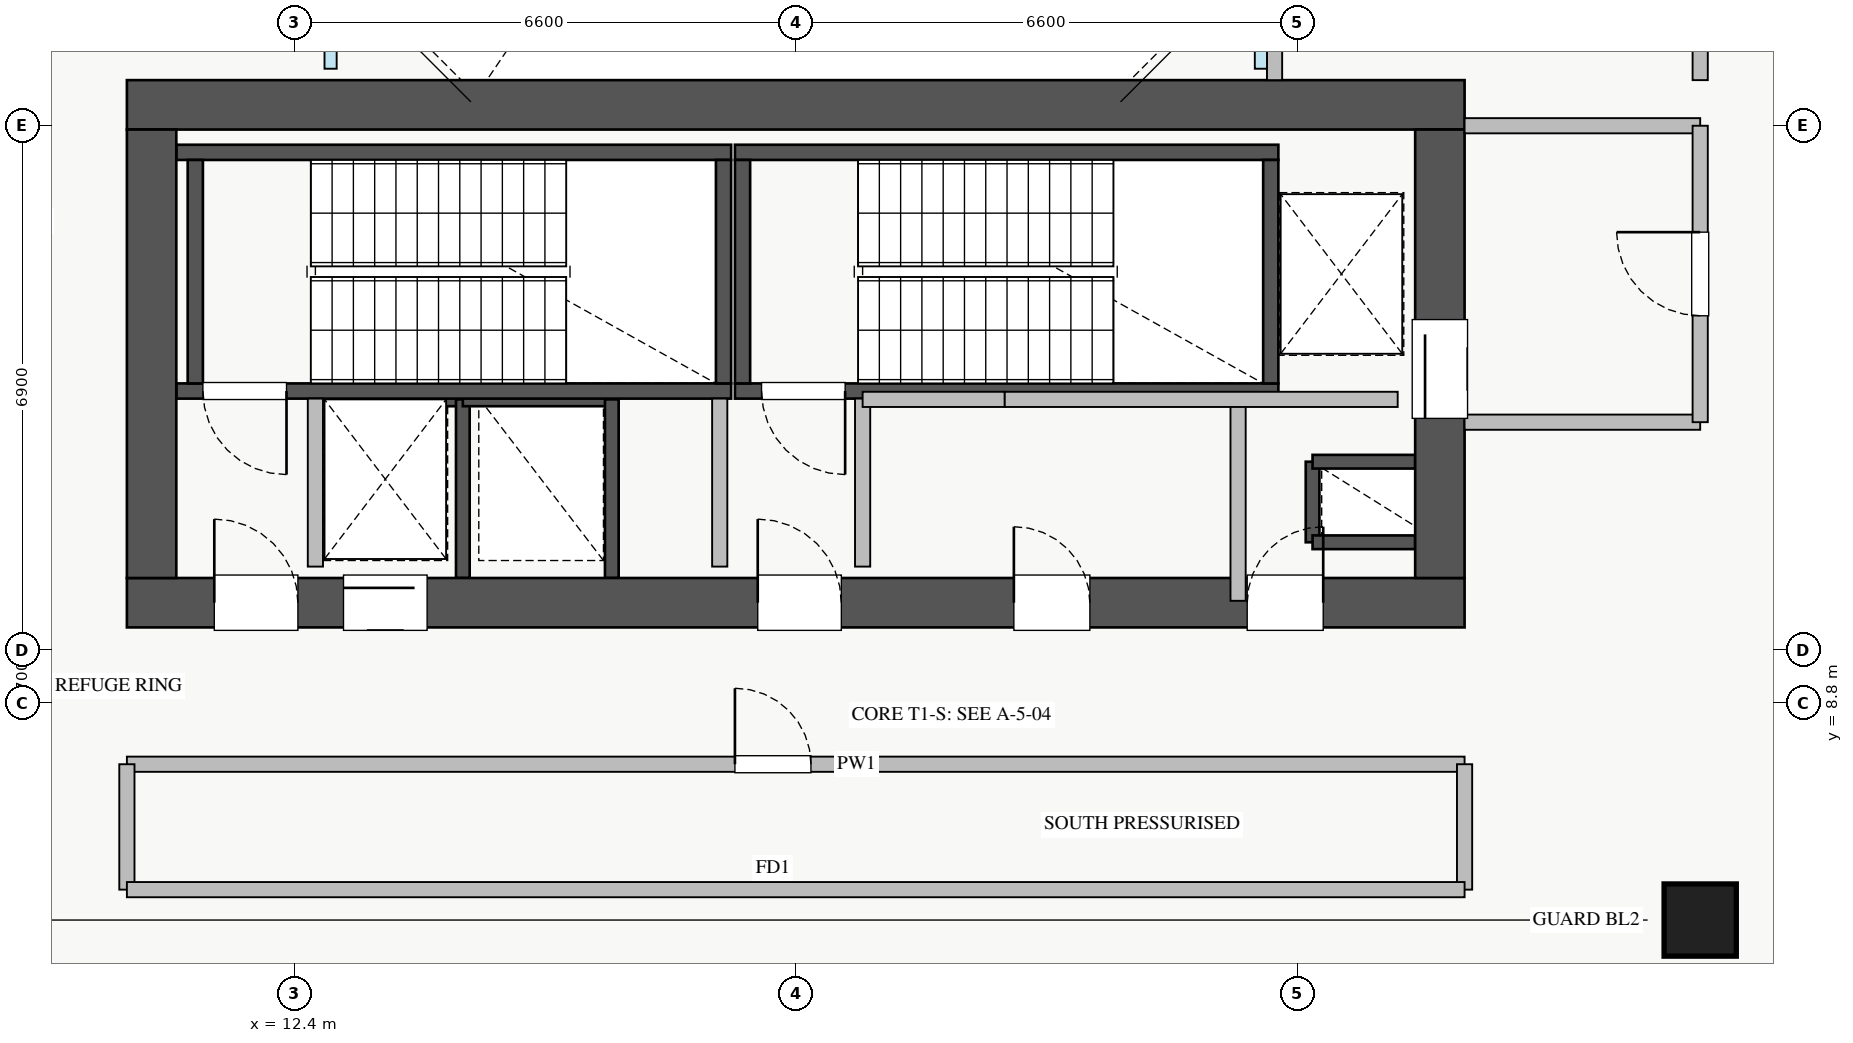
"""IFC4 building model, lengths in metres.
Left out: names, types, materials, properties, quantities, classifications, styles, units other than length and angle.
Written with IfcOpenShell. Run it as: python <this file> out.ifc"""

import sys

from ifc_helpers import new_model, si_unit, direction, frame, frame_2d, origin, origin_2d, place, context, subcontext, project, spatial, rectangle, extrude, source, transform, mapped, element, fill, save


model = new_model("IFC4")
c1 = context("Model", 3, precision=1e-05, world=origin(), true_north=direction((0.0, 1.0)))
c2 = subcontext(c1, "Body", "Model", "MODEL_VIEW")
j1 = project(units=[si_unit("LENGTHUNIT", "METRE"), si_unit("PLANEANGLEUNIT", "RADIAN")], contexts=[c1])
p1 = place(None, origin())
s1 = spatial("IfcSite", under=j1, at=p1, CompositionType="ELEMENT")
p2 = place(p1, origin())
s2 = spatial("IfcBuilding", under=s1, at=p2, CompositionType="ELEMENT")
p3 = place(p2, frame((0.0, 0.0, 186.0)))
s3 = spatial("IfcBuildingStorey", under=s2, at=p3, CompositionType="ELEMENT", Elevation=186.0)
p4 = place(p3, frame((12.68, 12.8, 0.0), z_axis=(0.0, 0.0, 1.0), x_axis=(1.0, 0.0, 0.0)))
e1 = element("IfcWall", 1, at=p4, inside=s3, PredefinedType="SHEAR", context=c2, shape_type="SweptSolid", body=[
    extrude(rectangle(XDim=1.94, YDim=0.18, at=frame_2d((0.97, 0.0))), origin(), (0.0, 0.0, 1.0), 4.32),
])
p5 = place(p3, frame((14.62, 10.45, 0.0), z_axis=(0.0, 0.0, 1.0), x_axis=(0.0, 1.0, 0.0)))
e2 = element("IfcWall", 2, at=p5, inside=s3, PredefinedType="SHEAR", context=c2, shape_type="SweptSolid", body=[
    extrude(rectangle(XDim=2.35, YDim=0.18, at=frame_2d((1.175, 0.0))), origin(), (0.0, 0.0, 1.0), 4.32),
])
p6 = place(p3, frame((25.8, 10.92, 0.0), z_axis=(0.0, 0.0, 1.0), x_axis=(0.0, 1.0, 0.0)))
e3 = element("IfcWall", 3, at=p6, inside=s3, PredefinedType="SHEAR", context=c2, shape_type="SweptSolid", body=[
    extrude(rectangle(XDim=1.06, YDim=0.18, at=frame_2d((0.53, 0.0))), origin(), (0.0, 0.0, 1.0), 4.32),
])
for number, where, z_axis, x_axis in (
    (4, (25.8, 11.98, 0.0), (0.0, 0.0, 1.0), (1.0, 0.0, 0.0)),
    (5, (25.8, 10.92, 0.0), (0.0, 0.0, 1.0), (1.0, 0.0, 0.0)),
):
    element("IfcWall", number, at=place(p3, frame(where, z_axis=z_axis, x_axis=x_axis)), inside=s3, PredefinedType="SHEAR", context=c2, shape_type="SweptSolid", body=[
        extrude(rectangle(XDim=1.35, YDim=0.18, at=frame_2d((0.675, 0.0))), origin(), (0.0, 0.0, 1.0), 4.32),
    ])
p7 = place(p3, frame((14.62, 12.8, 0.0), z_axis=(0.0, 0.0, 1.0), x_axis=(1.0, 0.0, 0.0)))
e6 = element("IfcWall", 6, at=p7, inside=s3, PredefinedType="SHEAR", context=c2, shape_type="SweptSolid", body=[
    extrude(rectangle(XDim=1.96, YDim=0.18, at=frame_2d((0.98, 0.0))), origin(), (0.0, 0.0, 1.0), 4.32),
])
p8 = place(p3, frame((16.58, 10.45, 0.0), z_axis=(0.0, 0.0, 1.0), x_axis=(0.0, 1.0, 0.0)))
e7 = element("IfcWall", 7, at=p8, inside=s3, PredefinedType="SHEAR", context=c2, shape_type="SweptSolid", body=[
    extrude(rectangle(XDim=2.35, YDim=0.18, at=frame_2d((1.175, 0.0))), origin(), (0.0, 0.0, 1.0), 4.32),
])
p9 = place(p3, frame((10.85, 12.91, 0.0), z_axis=(0.0, 0.0, 1.0), x_axis=(1.0, 0.0, 0.0)))
e8 = element("IfcWall", 8, at=p9, inside=s3, PredefinedType="SHEAR", context=c2, shape_type="SweptSolid", body=[
    extrude(rectangle(XDim=7.3, YDim=0.2, at=frame_2d((3.65, 0.0))), origin(), (0.0, 0.0, 1.0), 4.5),
])
p10 = place(p9, frame((0.35, 0.0, 0.0)))
e9 = element("IfcOpeningElement", 9, at=p10, cuts=e8, PredefinedType="OPENING", context=c2, shape_type="SweptSolid", body=[
    extrude(rectangle(XDim=1.1, YDim=2.05, at=frame_2d((0.55, 1.025))), frame((0.0, 0.11, 0.0), z_axis=(0.0, -1.0, 0.0), x_axis=(1.0, 0.0, 0.0)), (0.0, 0.0, 1.0), 0.22),
])
p11 = place(p3, frame((10.85, 16.05, 0.0), z_axis=(0.0, 0.0, 1.0), x_axis=(1.0, 0.0, 0.0)))
e10 = element("IfcWall", 10, at=p11, inside=s3, PredefinedType="SHEAR", context=c2, shape_type="SweptSolid", body=[
    extrude(rectangle(XDim=7.3, YDim=0.2, at=frame_2d((3.65, 0.0))), origin(), (0.0, 0.0, 1.0), 4.5),
])
for number, where, z_axis, x_axis in (
    (11, (11.1, 13.01, 0.0), (0.0, 0.0, 1.0), (0.0, 1.0, 0.0)),
    (12, (18.05, 13.01, 0.0), (0.0, 0.0, 1.0), (0.0, 1.0, 0.0)),
):
    element("IfcWall", number, at=place(p3, frame(where, z_axis=z_axis, x_axis=x_axis)), inside=s3, PredefinedType="SHEAR", context=c2, shape_type="SweptSolid", body=[
        extrude(rectangle(XDim=2.94, YDim=0.2, at=frame_2d((1.47, 0.0))), origin(), (0.0, 0.0, 1.0), 4.5),
    ])
p12 = place(p3, frame((18.2, 12.91, 0.0), z_axis=(0.0, 0.0, 1.0), x_axis=(1.0, 0.0, 0.0)))
e13 = element("IfcWall", 13, at=p12, inside=s3, PredefinedType="SHEAR", context=c2, shape_type="SweptSolid", body=[
    extrude(rectangle(XDim=7.15, YDim=0.2, at=frame_2d((3.575, 0.0))), origin(), (0.0, 0.0, 1.0), 4.5),
])
p13 = place(p12, frame((0.35, 0.0, 0.0)))
e14 = element("IfcOpeningElement", 14, at=p13, cuts=e13, PredefinedType="OPENING", context=c2, shape_type="SweptSolid", body=[
    extrude(rectangle(XDim=1.1, YDim=2.05, at=frame_2d((0.55, 1.025))), frame((0.0, 0.11, 0.0), z_axis=(0.0, -1.0, 0.0), x_axis=(1.0, 0.0, 0.0)), (0.0, 0.0, 1.0), 0.22),
])
p14 = place(p3, frame((18.2, 16.05, 0.0), z_axis=(0.0, 0.0, 1.0), x_axis=(1.0, 0.0, 0.0)))
e15 = element("IfcWall", 15, at=p14, inside=s3, PredefinedType="SHEAR", context=c2, shape_type="SweptSolid", body=[
    extrude(rectangle(XDim=7.15, YDim=0.2, at=frame_2d((3.575, 0.0))), origin(), (0.0, 0.0, 1.0), 4.5),
])
for number, where, z_axis, x_axis in (
    (16, (18.3, 13.01, 0.0), (0.0, 0.0, 1.0), (0.0, 1.0, 0.0)),
    (17, (25.25, 13.01, 0.0), (0.0, 0.0, 1.0), (0.0, 1.0, 0.0)),
):
    element("IfcWall", number, at=place(p3, frame(where, z_axis=z_axis, x_axis=x_axis)), inside=s3, PredefinedType="SHEAR", context=c2, shape_type="SweptSolid", body=[
        extrude(rectangle(XDim=2.94, YDim=0.2, at=frame_2d((1.47, 0.0))), origin(), (0.0, 0.0, 1.0), 4.5),
    ])
p15 = place(p3, frame((10.2, 10.125, 0.0), z_axis=(0.0, 0.0, 1.0), x_axis=(1.0, 0.0, 0.0)))
e18 = element("IfcWall", 18, at=p15, inside=s3, PredefinedType="SHEAR", context=c2, shape_type="SweptSolid", body=[
    extrude(rectangle(XDim=17.6, YDim=0.65, at=frame_2d((8.8, 0.0))), origin(), (0.0, 0.0, 1.0), 4.5),
])
p16 = place(p15, frame((1.15, 0.0, 0.0)))
e19 = element("IfcOpeningElement", 19, at=p16, cuts=e18, PredefinedType="OPENING", context=c2, shape_type="SweptSolid", body=[
    extrude(rectangle(XDim=1.1, YDim=2.05, at=frame_2d((0.55, 1.025))), frame((0.0, 0.335, 0.0), z_axis=(0.0, -1.0, 0.0), x_axis=(1.0, 0.0, 0.0)), (0.0, 0.0, 1.0), 0.67),
])
p17 = place(p15, frame((8.3, 0.0, 0.0)))
e20 = element("IfcOpeningElement", 20, at=p17, cuts=e18, PredefinedType="OPENING", context=c2, shape_type="SweptSolid", body=[
    extrude(rectangle(XDim=1.1, YDim=2.05, at=frame_2d((0.55, 1.025))), frame((0.0, 0.335, 0.0), z_axis=(0.0, -1.0, 0.0), x_axis=(1.0, 0.0, 0.0)), (0.0, 0.0, 1.0), 0.67),
])
p18 = place(p15, frame((2.85, 0.0, 0.0)))
e21 = element("IfcOpeningElement", 21, at=p18, cuts=e18, PredefinedType="OPENING", context=c2, shape_type="SweptSolid", body=[
    extrude(rectangle(XDim=1.1, YDim=2.05, at=frame_2d((0.55, 1.025))), frame((0.0, 0.335, 0.0), z_axis=(0.0, -1.0, 0.0), x_axis=(1.0, 0.0, 0.0)), (0.0, 0.0, 1.0), 0.67),
])
p19 = place(p15, frame((14.74, 0.0, 0.0)))
e22 = element("IfcOpeningElement", 22, at=p19, cuts=e18, PredefinedType="OPENING", context=c2, shape_type="SweptSolid", body=[
    extrude(rectangle(XDim=1.0, YDim=2.05, at=frame_2d((0.5, 1.025))), frame((0.0, 0.335, 0.0), z_axis=(0.0, -1.0, 0.0), x_axis=(1.0, 0.0, 0.0)), (0.0, 0.0, 1.0), 0.67),
])
p20 = place(p15, frame((11.67, 0.0, 0.0)))
e23 = element("IfcOpeningElement", 23, at=p20, cuts=e18, PredefinedType="OPENING", context=c2, shape_type="SweptSolid", body=[
    extrude(rectangle(XDim=1.0, YDim=2.05, at=frame_2d((0.5, 1.025))), frame((0.0, 0.335, 0.0), z_axis=(0.0, -1.0, 0.0), x_axis=(1.0, 0.0, 0.0)), (0.0, 0.0, 1.0), 0.67),
])
p21 = place(p3, frame((10.2, 16.675, 0.0), z_axis=(0.0, 0.0, 1.0), x_axis=(1.0, 0.0, 0.0)))
e24 = element("IfcWall", 24, at=p21, inside=s3, PredefinedType="SHEAR", context=c2, shape_type="SweptSolid", body=[
    extrude(rectangle(XDim=17.6, YDim=0.65, at=frame_2d((8.8, 0.0))), origin(), (0.0, 0.0, 1.0), 4.5),
])
p22 = place(p3, frame((10.525, 10.45, 0.0), z_axis=(0.0, 0.0, 1.0), x_axis=(0.0, 1.0, 0.0)))
e25 = element("IfcWall", 25, at=p22, inside=s3, PredefinedType="SHEAR", context=c2, shape_type="SweptSolid", body=[
    extrude(rectangle(XDim=5.9, YDim=0.65, at=frame_2d((2.95, 0.0))), origin(), (0.0, 0.0, 1.0), 4.5),
])
p23 = place(p3, frame((27.475, 10.45, 0.0), z_axis=(0.0, 0.0, 1.0), x_axis=(0.0, 1.0, 0.0)))
e26 = element("IfcWall", 26, at=p23, inside=s3, PredefinedType="SHEAR", context=c2, shape_type="SweptSolid", body=[
    extrude(rectangle(XDim=5.9, YDim=0.65, at=frame_2d((2.95, 0.0))), origin(), (0.0, 0.0, 1.0), 4.5),
])
p24 = place(p23, frame((2.1, 0.0, 0.0)))
e27 = element("IfcOpeningElement", 27, at=p24, cuts=e26, PredefinedType="OPENING", context=c2, shape_type="SweptSolid", body=[
    extrude(rectangle(XDim=1.3, YDim=2.05, at=frame_2d((0.65, 1.025))), frame((0.0, 0.335, 0.0), z_axis=(0.0, -1.0, 0.0), x_axis=(1.0, 0.0, 0.0)), (0.0, 0.0, 1.0), 0.67),
])
m1 = source(origin(), c2, "Body", "SweptSolid", [
    extrude(rectangle(XDim=0.95, YDim=0.95, at=origin_2d()), origin(), (0.0, 0.0, 1.0), 4.5),
])
p25 = place(p3, frame((30.9, 5.95, 0.0), z_axis=(0.0, 0.0, 1.0), x_axis=(1.0, 0.0, 0.0)))
e28 = element("IfcColumn", 28, at=p25, inside=s3, PredefinedType="COLUMN", context=c2, shape_type="MappedRepresentation", body=[
    mapped(m1, transform((0.0, 0.0, 0.0), x_axis=(1.0, 0.0, 0.0), y_axis=(0.0, 1.0, 0.0), z_axis=(0.0, 0.0, 1.0), scale=1.0)),
])
p26 = place(p3, frame((27.8, 16.4, 0.0), z_axis=(0.0, 0.0, 1.0), x_axis=(1.0, 0.0, 0.0)))
e29 = element("IfcWall", 29, at=p26, inside=s3, PredefinedType="PARTITIONING", context=c2, shape_type="SweptSolid", body=[
    extrude(rectangle(XDim=3.1, YDim=0.2, at=frame_2d((1.55, 0.0))), origin(), (0.0, 0.0, 1.0), 4.32),
])
p27 = place(p3, frame((27.8, 12.5, 0.0), z_axis=(0.0, 0.0, 1.0), x_axis=(1.0, 0.0, 0.0)))
e30 = element("IfcWall", 30, at=p27, inside=s3, PredefinedType="PARTITIONING", context=c2, shape_type="SweptSolid", body=[
    extrude(rectangle(XDim=3.1, YDim=0.2, at=frame_2d((1.55, 0.0))), origin(), (0.0, 0.0, 1.0), 2.515),
])
p28 = place(p3, frame((30.9, 12.5, 0.0), z_axis=(0.0, 0.0, 1.0), x_axis=(0.0, 1.0, 0.0)))
e31 = element("IfcWall", 31, at=p28, inside=s3, PredefinedType="PARTITIONING", context=c2, shape_type="SweptSolid", body=[
    extrude(rectangle(XDim=3.9, YDim=0.2, at=frame_2d((1.95, 0.0))), origin(), (0.0, 0.0, 1.0), 4.32),
])
p29 = place(p28, frame((1.4, 0.0, 0.0)))
e32 = element("IfcOpeningElement", 32, at=p29, cuts=e31, PredefinedType="OPENING", context=c2, shape_type="SweptSolid", body=[
    extrude(rectangle(XDim=1.1, YDim=2.05, at=frame_2d((0.55, 1.025))), frame((0.0, 0.11, 0.0), z_axis=(0.0, -1.0, 0.0), x_axis=(1.0, 0.0, 0.0)), (0.0, 0.0, 1.0), 0.22),
])
for number, where, z_axis, x_axis in (
    (33, (12.68, 10.6, 0.0), (0.0, 0.0, 1.0), (0.0, 1.0, 0.0)),
    (34, (18.0, 10.6, 0.0), (0.0, 0.0, 1.0), (0.0, 1.0, 0.0)),
    (35, (19.88, 10.6, 0.0), (0.0, 0.0, 1.0), (0.0, 1.0, 0.0)),
):
    element("IfcWall", number, at=place(p3, frame(where, z_axis=z_axis, x_axis=x_axis)), inside=s3, PredefinedType="PARTITIONING", context=c2, shape_type="SweptSolid", body=[
        extrude(rectangle(XDim=2.21, YDim=0.2, at=frame_2d((1.105, 0.0))), origin(), (0.0, 0.0, 1.0), 4.32),
    ])
p30 = place(p3, frame((24.82, 10.15, 0.0), z_axis=(0.0, 0.0, 1.0), x_axis=(0.0, 1.0, 0.0)))
e36 = element("IfcWall", 36, at=p30, inside=s3, PredefinedType="PARTITIONING", context=c2, shape_type="SweptSolid", body=[
    extrude(rectangle(XDim=2.65, YDim=0.2, at=frame_2d((1.325, 0.0))), origin(), (0.0, 0.0, 1.0), 4.32),
])
p31 = place(p3, frame((19.88, 12.8, 0.0), z_axis=(0.0, 0.0, 1.0), x_axis=(1.0, 0.0, 0.0)))
e37 = element("IfcWall", 37, at=p31, inside=s3, PredefinedType="PARTITIONING", context=c2, shape_type="SweptSolid", body=[
    extrude(rectangle(XDim=1.87, YDim=0.2, at=frame_2d((0.935, 0.0))), origin(), (0.0, 0.0, 1.0), 4.32),
])
p32 = place(p3, frame((21.75, 12.8, 0.0), z_axis=(0.0, 0.0, 1.0), x_axis=(1.0, 0.0, 0.0)))
e38 = element("IfcWall", 38, at=p32, inside=s3, PredefinedType="PARTITIONING", context=c2, shape_type="SweptSolid", body=[
    extrude(rectangle(XDim=5.17, YDim=0.2, at=frame_2d((2.585, 0.0))), origin(), (0.0, 0.0, 1.0), 4.32),
])
p33 = place(p3, frame((10.2, 8.0, 0.0), z_axis=(0.0, 0.0, 1.0), x_axis=(1.0, 0.0, 0.0)))
e39 = element("IfcWall", 39, at=p33, inside=s3, PredefinedType="PARTITIONING", context=c2, shape_type="SweptSolid", body=[
    extrude(rectangle(XDim=17.6, YDim=0.2, at=frame_2d((8.8, 0.0))), origin(), (0.0, 0.0, 1.0), 4.32),
])
p34 = place(p33, frame((8.0, 0.0, 0.0)))
e40 = element("IfcOpeningElement", 40, at=p34, cuts=e39, PredefinedType="OPENING", context=c2, shape_type="SweptSolid", body=[
    extrude(rectangle(XDim=1.0, YDim=2.05, at=frame_2d((0.5, 1.025))), frame((0.0, 0.11, 0.0), z_axis=(0.0, -1.0, 0.0), x_axis=(1.0, 0.0, 0.0)), (0.0, 0.0, 1.0), 0.22),
])
for number, where, z_axis, x_axis in (
    (41, (10.2, 6.35, 0.0), (0.0, 0.0, 1.0), (0.0, 1.0, 0.0)),
    (42, (27.8, 6.35, 0.0), (0.0, 0.0, 1.0), (0.0, 1.0, 0.0)),
):
    element("IfcWall", number, at=place(p3, frame(where, z_axis=z_axis, x_axis=x_axis)), inside=s3, PredefinedType="PARTITIONING", context=c2, shape_type="SweptSolid", body=[
        extrude(rectangle(XDim=1.65, YDim=0.2, at=frame_2d((0.825, 0.0))), origin(), (0.0, 0.0, 1.0), 4.32),
    ])
p35 = place(p3, frame((10.2, 6.35, 0.0), z_axis=(0.0, 0.0, 1.0), x_axis=(1.0, 0.0, 0.0)))
e43 = element("IfcWall", 43, at=p35, inside=s3, PredefinedType="PARTITIONING", context=c2, shape_type="SweptSolid", body=[
    extrude(rectangle(XDim=17.6, YDim=0.2, at=frame_2d((8.8, 0.0))), origin(), (0.0, 0.0, 1.0), 1.915),
])
p36 = place(p3, frame((25.3, 17.0, 0.0), z_axis=(0.0, 0.0, 1.0), x_axis=(0.0, 1.0, 0.0)))
e44 = element("IfcWall", 44, at=p36, inside=s3, PredefinedType="PARTITIONING", context=c2, shape_type="SweptSolid", body=[
    extrude(rectangle(XDim=12.0, YDim=0.2, at=frame_2d((6.0, 0.0))), origin(), (0.0, 0.0, 1.0), 2.515),
])
p37 = place(p3, frame((30.9, 17.0, 0.0), z_axis=(0.0, 0.0, 1.0), x_axis=(0.0, 1.0, 0.0)))
e45 = element("IfcWall", 45, at=p37, inside=s3, PredefinedType="PARTITIONING", context=c2, shape_type="SweptSolid", body=[
    extrude(rectangle(XDim=12.0, YDim=0.2, at=frame_2d((6.0, 0.0))), origin(), (0.0, 0.0, 1.0), 4.32),
])
p38 = place(p37, frame((1.25, 0.0, 0.0)))
e46 = element("IfcOpeningElement", 46, at=p38, cuts=e45, PredefinedType="OPENING", context=c2, shape_type="SweptSolid", body=[
    extrude(rectangle(XDim=1.0, YDim=2.05, at=frame_2d((0.5, 1.025))), frame((0.0, 0.11, 0.0), z_axis=(0.0, -1.0, 0.0), x_axis=(1.0, 0.0, 0.0)), (0.0, 0.0, 1.0), 0.22),
])
p39 = place(p37, frame((7.25, 0.0, 0.0)))
e47 = element("IfcOpeningElement", 47, at=p39, cuts=e45, PredefinedType="OPENING", context=c2, shape_type="SweptSolid", body=[
    extrude(rectangle(XDim=1.0, YDim=2.05, at=frame_2d((0.5, 1.025))), frame((0.0, 0.11, 0.0), z_axis=(0.0, -1.0, 0.0), x_axis=(1.0, 0.0, 0.0)), (0.0, 0.0, 1.0), 0.22),
])
m2 = source(origin(), c2, "Body", "SweptSolid", [
    extrude(rectangle(XDim=1.3, YDim=2.05, at=frame_2d((0.65, 1.025))), frame((0.0, 0.025, 0.0), z_axis=(0.0, -1.0, 0.0), x_axis=(1.0, 0.0, 0.0)), (0.0, 0.0, 1.0), 0.05),
])
p40 = place(p24, origin())
e48 = element("IfcDoor", 48, at=p40, inside=s3, OperationType="SLIDING_TO_RIGHT", PredefinedType="DOOR", context=c2, shape_type="MappedRepresentation", body=[
    mapped(m2, transform((0.0, 0.0, 0.0), x_axis=(1.0, 0.0, 0.0), y_axis=(0.0, 1.0, 0.0), z_axis=(0.0, 0.0, 1.0), scale=1.0)),
])
fill(e27, e48)
m3 = source(origin(), c2, "Body", "SweptSolid", [
    extrude(rectangle(XDim=1.1, YDim=2.05, at=frame_2d((0.55, 1.025))), frame((0.0, 0.025, 0.0), z_axis=(0.0, -1.0, 0.0), x_axis=(1.0, 0.0, 0.0)), (0.0, 0.0, 1.0), 0.05),
])
p41 = place(p16, origin())
e49 = element("IfcDoor", 49, at=p41, inside=s3, OperationType="SINGLE_SWING_LEFT", PredefinedType="DOOR", context=c2, shape_type="MappedRepresentation", body=[
    mapped(m3, transform((0.0, 0.0, 0.0), x_axis=(1.0, 0.0, 0.0), y_axis=(0.0, 1.0, 0.0), z_axis=(0.0, 0.0, 1.0), scale=1.0)),
])
fill(e19, e49)
p42 = place(p10, frame((1.1, 0.0, 0.0), z_axis=(0.0, 0.0, 1.0), x_axis=(-1.0, 0.0, 0.0)))
e50 = element("IfcDoor", 50, at=p42, inside=s3, OperationType="SINGLE_SWING_RIGHT", PredefinedType="DOOR", context=c2, shape_type="MappedRepresentation", body=[
    mapped(m3, transform((0.0, 0.0, 0.0), x_axis=(1.0, 0.0, 0.0), y_axis=(0.0, 1.0, 0.0), z_axis=(0.0, 0.0, 1.0), scale=1.0)),
])
fill(e9, e50)
p43 = place(p17, origin())
e51 = element("IfcDoor", 51, at=p43, inside=s3, OperationType="SINGLE_SWING_LEFT", PredefinedType="DOOR", context=c2, shape_type="MappedRepresentation", body=[
    mapped(m3, transform((0.0, 0.0, 0.0), x_axis=(1.0, 0.0, 0.0), y_axis=(0.0, 1.0, 0.0), z_axis=(0.0, 0.0, 1.0), scale=1.0)),
])
fill(e20, e51)
p44 = place(p13, frame((1.1, 0.0, 0.0), z_axis=(0.0, 0.0, 1.0), x_axis=(-1.0, 0.0, 0.0)))
e52 = element("IfcDoor", 52, at=p44, inside=s3, OperationType="SINGLE_SWING_RIGHT", PredefinedType="DOOR", context=c2, shape_type="MappedRepresentation", body=[
    mapped(m3, transform((0.0, 0.0, 0.0), x_axis=(1.0, 0.0, 0.0), y_axis=(0.0, 1.0, 0.0), z_axis=(0.0, 0.0, 1.0), scale=1.0)),
])
fill(e14, e52)
p45 = place(p18, origin())
e53 = element("IfcDoor", 53, at=p45, inside=s3, OperationType="SLIDING_TO_RIGHT", PredefinedType="DOOR", context=c2, shape_type="MappedRepresentation", body=[
    mapped(m3, transform((0.0, 0.0, 0.0), x_axis=(1.0, 0.0, 0.0), y_axis=(0.0, 1.0, 0.0), z_axis=(0.0, 0.0, 1.0), scale=1.0)),
])
fill(e21, e53)
m4 = source(origin(), c2, "Body", "SweptSolid", [
    extrude(rectangle(XDim=1.0, YDim=2.05, at=frame_2d((0.5, 1.025))), frame((0.0, 0.025, 0.0), z_axis=(0.0, -1.0, 0.0), x_axis=(1.0, 0.0, 0.0)), (0.0, 0.0, 1.0), 0.05),
])
p46 = place(p19, origin())
e54 = element("IfcDoor", 54, at=p46, inside=s3, OperationType="SINGLE_SWING_RIGHT", PredefinedType="DOOR", context=c2, shape_type="MappedRepresentation", body=[
    mapped(m4, transform((0.0, 0.0, 0.0), x_axis=(1.0, 0.0, 0.0), y_axis=(0.0, 1.0, 0.0), z_axis=(0.0, 0.0, 1.0), scale=1.0)),
])
fill(e22, e54)
p47 = place(p20, origin())
e55 = element("IfcDoor", 55, at=p47, inside=s3, OperationType="SINGLE_SWING_LEFT", PredefinedType="DOOR", context=c2, shape_type="MappedRepresentation", body=[
    mapped(m4, transform((0.0, 0.0, 0.0), x_axis=(1.0, 0.0, 0.0), y_axis=(0.0, 1.0, 0.0), z_axis=(0.0, 0.0, 1.0), scale=1.0)),
])
fill(e23, e55)
p48 = place(p29, origin())
e56 = element("IfcDoor", 56, at=p48, inside=s3, OperationType="SINGLE_SWING_RIGHT", PredefinedType="DOOR", context=c2, shape_type="MappedRepresentation", body=[
    mapped(m3, transform((0.0, 0.0, 0.0), x_axis=(1.0, 0.0, 0.0), y_axis=(0.0, 1.0, 0.0), z_axis=(0.0, 0.0, 1.0), scale=1.0)),
])
fill(e32, e56)
p49 = place(p34, origin())
e57 = element("IfcDoor", 57, at=p49, inside=s3, OperationType="SINGLE_SWING_LEFT", PredefinedType="DOOR", context=c2, shape_type="MappedRepresentation", body=[
    mapped(m4, transform((0.0, 0.0, 0.0), x_axis=(1.0, 0.0, 0.0), y_axis=(0.0, 1.0, 0.0), z_axis=(0.0, 0.0, 1.0), scale=1.0)),
])
fill(e40, e57)
save(model, sys.argv[1])
